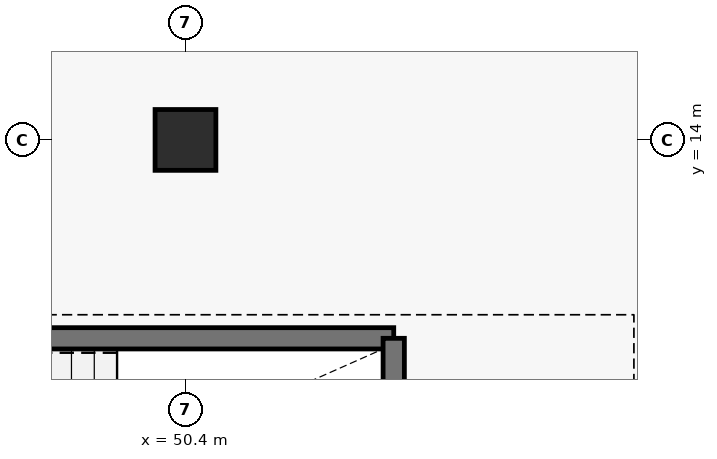
"""IFC4 building model, lengths in metres.
Left out: names, types, materials, properties, quantities, classifications, styles, units other than length and angle.
Written with IfcOpenShell. Run it as: python <this file> out.ifc"""

import sys

from ifc_helpers import new_model, si_unit, direction, frame, frame_2d, origin, origin_2d, place, context, subcontext, project, spatial, rectangle, extrude, element, save


model = new_model("IFC4")
c1 = context("Model", 3, precision=1e-05, world=origin(), true_north=direction((0.0, 1.0)))
c2 = subcontext(c1, "Body", "Model", "MODEL_VIEW")
j1 = project(units=[si_unit("LENGTHUNIT", "METRE"), si_unit("PLANEANGLEUNIT", "RADIAN")], contexts=[c1])
p1 = place(None, origin())
s1 = spatial("IfcSite", under=j1, at=p1, CompositionType="ELEMENT")
p2 = place(p1, origin())
s2 = spatial("IfcBuilding", under=s1, at=p2, CompositionType="ELEMENT")
p3 = place(p2, frame((0.0, 0.0, 5.44)))
s3 = spatial("IfcBuildingStorey", under=s2, at=p3, CompositionType="ELEMENT", Elevation=5.44)
p4 = place(p3, frame((50.4, 14.0, 0.0), z_axis=(0.0, 0.0, 1.0), x_axis=(1.0, 0.0, 0.0)))
e1 = element("IfcColumn", 1, at=p4, inside=s3, PredefinedType="COLUMN", context=c2, shape_type="SweptSolid", body=[
    extrude(rectangle(XDim=0.8, YDim=0.8, at=origin_2d()), origin(), (0.0, 0.0, 1.0), 4.16),
])
p5 = place(p3, frame((44.26, 11.39, 0.0), z_axis=(0.0, 0.0, 1.0), x_axis=(1.0, 0.0, 0.0)))
e2 = element("IfcWall", 2, at=p5, inside=s3, PredefinedType="SHEAR", context=c2, shape_type="SweptSolid", body=[
    extrude(rectangle(XDim=8.88, YDim=0.28, at=frame_2d((4.44, 0.0))), origin(), (0.0, 0.0, 1.0), 4.16),
])
p6 = place(p3, frame((53.14, 7.96, 0.0), z_axis=(0.0, 0.0, 1.0), x_axis=(0.0, 1.0, 0.0)))
e3 = element("IfcWall", 3, at=p6, inside=s3, PredefinedType="SHEAR", context=c2, shape_type="SweptSolid", body=[
    extrude(rectangle(XDim=3.43, YDim=0.28, at=frame_2d((1.715, 0.0))), origin(), (0.0, 0.0, 1.0), 4.16),
])
save(model, sys.argv[1])
